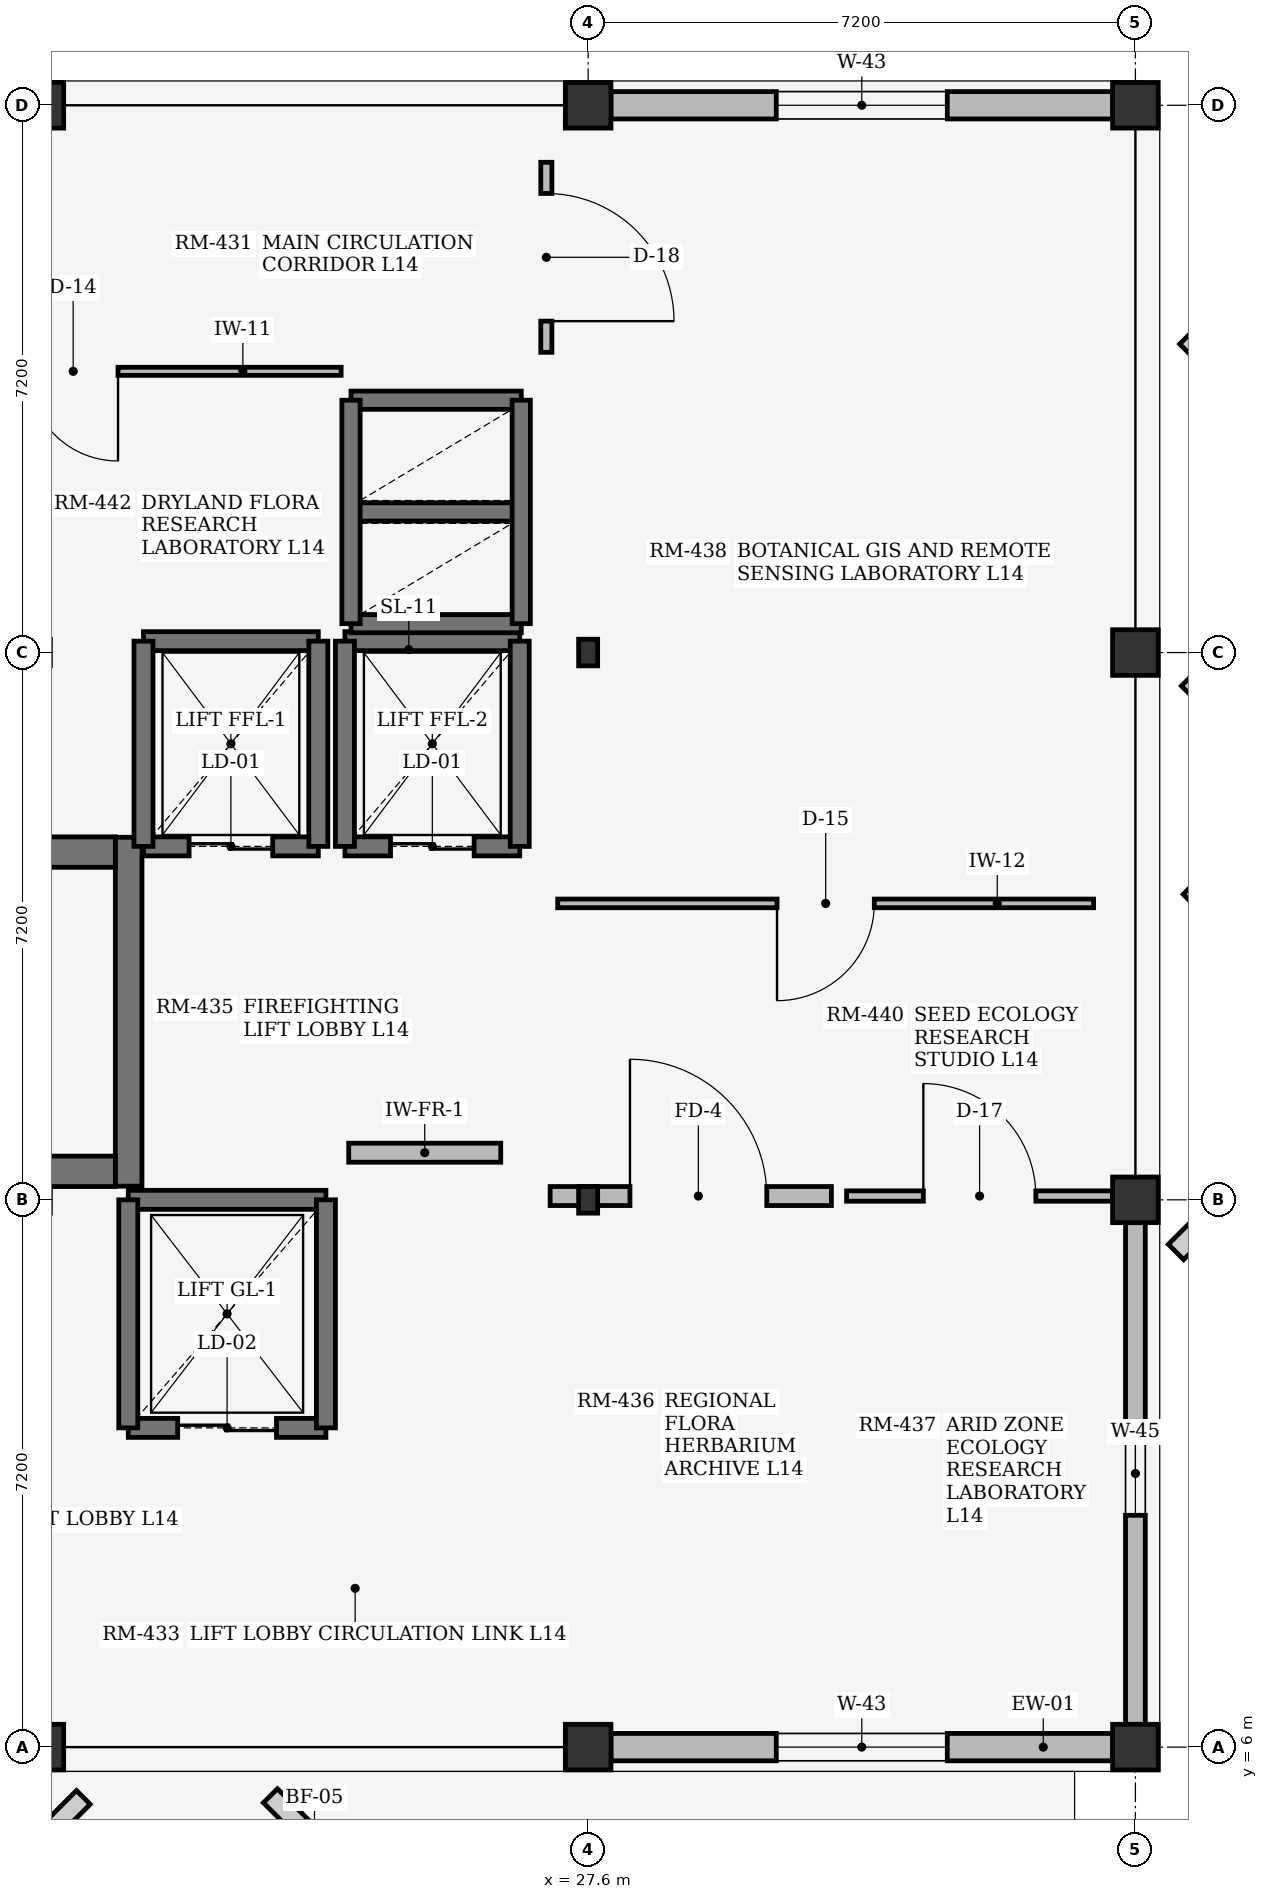
"""IFC4 building model, lengths in metres.
Left out: names, types, materials, properties, quantities, classifications, styles, units other than length and angle.
Written with IfcOpenShell. Run it as: python <this file> out.ifc"""

import sys

from ifc_helpers import new_model, si_unit, direction, frame, frame_2d, origin, origin_2d, place, context, subcontext, project, spatial, rectangle, i_section, extrude, element, fill, save


model = new_model("IFC4")
c1 = context("Model", 3, precision=1e-05, world=origin(), true_north=direction((0.0, 1.0)))
c2 = subcontext(c1, "Body", "Model", "MODEL_VIEW")
j1 = project(units=[si_unit("LENGTHUNIT", "METRE"), si_unit("PLANEANGLEUNIT", "RADIAN")], contexts=[c1])
p1 = place(None, origin())
s1 = spatial("IfcSite", under=j1, at=p1, CompositionType="ELEMENT")
p2 = place(p1, origin())
s2 = spatial("IfcBuilding", under=s1, at=p2, CompositionType="ELEMENT")
p3 = place(p2, frame((0.0, 0.0, 56.1)))
s3 = spatial("IfcBuildingStorey", under=s2, at=p3, CompositionType="ELEMENT", Elevation=56.1)
for number, where, z_axis, x_axis in (
    (1, (20.4, 6.0, 0.0), (0.0, 0.0, 1.0), (1.0, 0.0, 0.0)),
    (2, (20.4, 27.6, 0.0), (0.0, 0.0, 1.0), (1.0, 0.0, 0.0)),
    (3, (27.6, 6.0, 0.0), (0.0, 0.0, 1.0), (1.0, 0.0, 0.0)),
):
    element("IfcColumn", number, at=place(p3, frame(where, z_axis=z_axis, x_axis=x_axis)), inside=s3, PredefinedType="COLUMN", context=c2, shape_type="SweptSolid", body=[
        extrude(rectangle(XDim=0.6, YDim=0.6, at=origin_2d()), origin(), (0.0, 0.0, 1.0), 3.088),
    ])
for number, where, z_axis, x_axis in (
    (4, (27.6, 13.2, 0.0), (0.0, 0.0, 1.0), (1.0, 0.0, 0.0)),
    (5, (27.6, 20.4, 0.0), (0.0, 0.0, 1.0), (1.0, 0.0, 0.0)),
):
    element("IfcColumn", number, at=place(p3, frame(where, z_axis=z_axis, x_axis=x_axis)), inside=s3, PredefinedType="COLUMN", context=c2, shape_type="SweptSolid", body=[
        extrude(i_section(OverallWidth=0.25, OverallDepth=0.35, WebThickness=0.01, FlangeThickness=0.012, at=origin_2d()), origin(), (0.0, 0.0, 1.0), 3.088),
    ])
for number, where, z_axis, x_axis in (
    (6, (27.6, 27.6, 0.0), (0.0, 0.0, 1.0), (1.0, 0.0, 0.0)),
    (7, (34.8, 6.0, 0.0), (0.0, 0.0, 1.0), (1.0, 0.0, 0.0)),
    (8, (34.8, 13.2, 0.0), (0.0, 0.0, 1.0), (1.0, 0.0, 0.0)),
    (9, (34.8, 20.4, 0.0), (0.0, 0.0, 1.0), (1.0, 0.0, 0.0)),
    (10, (34.8, 27.6, 0.0), (0.0, 0.0, 1.0), (1.0, 0.0, 0.0)),
):
    element("IfcColumn", number, at=place(p3, frame(where, z_axis=z_axis, x_axis=x_axis)), inside=s3, PredefinedType="COLUMN", context=c2, shape_type="SweptSolid", body=[
        extrude(rectangle(XDim=0.6, YDim=0.6, at=origin_2d()), origin(), (0.0, 0.0, 1.0), 3.088),
    ])
p4 = place(p3, frame((27.9, 6.0, 0.0), z_axis=(0.0, 0.0, 1.0), x_axis=(1.0, 0.0, 0.0)))
e11 = element("IfcWall", 11, at=p4, inside=s3, PredefinedType="STANDARD", context=c2, shape_type="SweptSolid", body=[
    extrude(rectangle(XDim=6.6, YDim=0.36, at=frame_2d((3.3, 0.0))), origin(), (0.0, 0.0, 1.0), 2.695),
])
p5 = place(p4, frame((2.175, 0.0, 0.75)))
e12 = element("IfcOpeningElement", 12, at=p5, cuts=e11, PredefinedType="OPENING", context=c2, shape_type="SweptSolid", body=[
    extrude(rectangle(XDim=2.25, YDim=1.5, at=frame_2d((1.125, 0.75))), frame((0.0, 0.19, 0.0), z_axis=(0.0, -1.0, 0.0), x_axis=(1.0, 0.0, 0.0)), (0.0, 0.0, 1.0), 0.38),
])
p6 = place(p3, frame((27.9, 27.6, 0.0), z_axis=(0.0, 0.0, 1.0), x_axis=(1.0, 0.0, 0.0)))
e13 = element("IfcWall", 13, at=p6, inside=s3, PredefinedType="STANDARD", context=c2, shape_type="SweptSolid", body=[
    extrude(rectangle(XDim=6.6, YDim=0.36, at=frame_2d((3.3, 0.0))), origin(), (0.0, 0.0, 1.0), 2.695),
])
p7 = place(p6, frame((2.175, 0.0, 0.75)))
e14 = element("IfcOpeningElement", 14, at=p7, cuts=e13, PredefinedType="OPENING", context=c2, shape_type="SweptSolid", body=[
    extrude(rectangle(XDim=2.25, YDim=1.5, at=frame_2d((1.125, 0.75))), frame((0.0, 0.19, 0.0), z_axis=(0.0, -1.0, 0.0), x_axis=(1.0, 0.0, 0.0)), (0.0, 0.0, 1.0), 0.38),
])
p8 = place(p3, frame((34.8, 6.3, 0.0), z_axis=(0.0, 0.0, 1.0), x_axis=(0.0, 1.0, 0.0)))
e15 = element("IfcWall", 15, at=p8, inside=s3, PredefinedType="STANDARD", context=c2, shape_type="SweptSolid", body=[
    extrude(rectangle(XDim=6.6, YDim=0.26, at=frame_2d((3.3, 0.0))), origin(), (0.0, 0.0, 1.0), 2.695),
])
p9 = place(p8, frame((2.75, 0.0, 0.75)))
e16 = element("IfcOpeningElement", 16, at=p9, cuts=e15, PredefinedType="OPENING", context=c2, shape_type="SweptSolid", body=[
    extrude(rectangle(XDim=1.1, YDim=1.25, at=frame_2d((0.55, 0.625))), frame((0.0, 0.14, 0.0), z_axis=(0.0, -1.0, 0.0), x_axis=(1.0, 0.0, 0.0)), (0.0, 0.0, 1.0), 0.28),
])
p10 = place(p3, frame((21.555, 13.38, 0.0), z_axis=(0.0, 0.0, 1.0), x_axis=(0.0, 1.0, 0.0)))
e17 = element("IfcWall", 17, at=p10, inside=s3, PredefinedType="SHEAR", context=c2, shape_type="SweptSolid", body=[
    extrude(rectangle(XDim=4.59, YDim=0.35, at=frame_2d((2.295, 0.0))), origin(), (0.0, 0.0, 1.0), 3.115),
])
for number, where, z_axis, x_axis in (
    (18, (13.4, 13.575, 0.0), (0.0, 0.0, 1.0), (1.0, 0.0, 0.0)),
    (19, (13.4, 17.775, 0.0), (0.0, 0.0, 1.0), (1.0, 0.0, 0.0)),
):
    element("IfcWall", number, at=place(p3, frame(where, z_axis=z_axis, x_axis=x_axis)), inside=s3, PredefinedType="SHEAR", context=c2, shape_type="SweptSolid", body=[
        extrude(rectangle(XDim=7.98, YDim=0.4, at=frame_2d((3.99, 0.0))), origin(), (0.0, 0.0, 1.0), 3.115),
    ])
p11 = place(p3, frame((21.75, 17.85, 0.0), z_axis=(0.0, 0.0, 1.0), x_axis=(1.0, 0.0, 0.0)))
e20 = element("IfcWall", 20, at=p11, inside=s3, PredefinedType="SHEAR", context=c2, shape_type="SweptSolid", body=[
    extrude(rectangle(XDim=2.3, YDim=0.25, at=frame_2d((1.15, 0.0))), origin(), (0.0, 0.0, 1.0), 3.115),
])
p12 = place(p11, frame((0.6, 0.0, 0.0)))
e21 = element("IfcOpeningElement", 21, at=p12, cuts=e20, PredefinedType="OPENING", context=c2, shape_type="SweptSolid", body=[
    extrude(rectangle(XDim=1.1, YDim=2.2, at=frame_2d((0.55, 1.1))), frame((0.0, 0.135, 0.0), z_axis=(0.0, -1.0, 0.0), x_axis=(1.0, 0.0, 0.0)), (0.0, 0.0, 1.0), 0.27),
])
p13 = place(p3, frame((21.75, 20.55, 0.0), z_axis=(0.0, 0.0, 1.0), x_axis=(1.0, 0.0, 0.0)))
e22 = element("IfcWall", 22, at=p13, inside=s3, PredefinedType="SHEAR", context=c2, shape_type="SweptSolid", body=[
    extrude(rectangle(XDim=2.3, YDim=0.25, at=frame_2d((1.15, 0.0))), origin(), (0.0, 0.0, 1.0), 3.115),
])
for number, where, z_axis, x_axis in (
    (23, (21.75, 17.85, 0.0), (0.0, 0.0, 1.0), (0.0, 1.0, 0.0)),
    (24, (24.05, 17.85, 0.0), (0.0, 0.0, 1.0), (0.0, 1.0, 0.0)),
):
    element("IfcWall", number, at=place(p3, frame(where, z_axis=z_axis, x_axis=x_axis)), inside=s3, PredefinedType="SHEAR", context=c2, shape_type="SweptSolid", body=[
        extrude(rectangle(XDim=2.7, YDim=0.25, at=frame_2d((1.35, 0.0))), origin(), (0.0, 0.0, 1.0), 3.115),
    ])
p14 = place(p3, frame((24.4, 17.85, 0.0), z_axis=(0.0, 0.0, 1.0), x_axis=(1.0, 0.0, 0.0)))
e25 = element("IfcWall", 25, at=p14, inside=s3, PredefinedType="SHEAR", context=c2, shape_type="SweptSolid", body=[
    extrude(rectangle(XDim=2.3, YDim=0.25, at=frame_2d((1.15, 0.0))), origin(), (0.0, 0.0, 1.0), 3.115),
])
p15 = place(p14, frame((0.6, 0.0, 0.0)))
e26 = element("IfcOpeningElement", 26, at=p15, cuts=e25, PredefinedType="OPENING", context=c2, shape_type="SweptSolid", body=[
    extrude(rectangle(XDim=1.1, YDim=2.2, at=frame_2d((0.55, 1.1))), frame((0.0, 0.135, 0.0), z_axis=(0.0, -1.0, 0.0), x_axis=(1.0, 0.0, 0.0)), (0.0, 0.0, 1.0), 0.27),
])
p16 = place(p3, frame((24.4, 20.55, 0.0), z_axis=(0.0, 0.0, 1.0), x_axis=(1.0, 0.0, 0.0)))
e27 = element("IfcWall", 27, at=p16, inside=s3, PredefinedType="SHEAR", context=c2, shape_type="SweptSolid", body=[
    extrude(rectangle(XDim=2.3, YDim=0.25, at=frame_2d((1.15, 0.0))), origin(), (0.0, 0.0, 1.0), 3.115),
])
for number, where, z_axis, x_axis in (
    (28, (24.4, 17.85, 0.0), (0.0, 0.0, 1.0), (0.0, 1.0, 0.0)),
    (29, (26.7, 17.85, 0.0), (0.0, 0.0, 1.0), (0.0, 1.0, 0.0)),
):
    element("IfcWall", number, at=place(p3, frame(where, z_axis=z_axis, x_axis=x_axis)), inside=s3, PredefinedType="SHEAR", context=c2, shape_type="SweptSolid", body=[
        extrude(rectangle(XDim=2.7, YDim=0.25, at=frame_2d((1.35, 0.0))), origin(), (0.0, 0.0, 1.0), 3.115),
    ])
p17 = place(p3, frame((21.55, 10.2, 0.0), z_axis=(0.0, 0.0, 1.0), x_axis=(1.0, 0.0, 0.0)))
e30 = element("IfcWall", 30, at=p17, inside=s3, PredefinedType="SHEAR", context=c2, shape_type="SweptSolid", body=[
    extrude(rectangle(XDim=2.6, YDim=0.25, at=frame_2d((1.3, 0.0))), origin(), (0.0, 0.0, 1.0), 3.115),
])
p18 = place(p17, frame((0.65, 0.0, 0.0)))
e31 = element("IfcOpeningElement", 31, at=p18, cuts=e30, PredefinedType="OPENING", context=c2, shape_type="SweptSolid", body=[
    extrude(rectangle(XDim=1.3, YDim=2.25, at=frame_2d((0.65, 1.125))), frame((0.0, 0.135, 0.0), z_axis=(0.0, -1.0, 0.0), x_axis=(1.0, 0.0, 0.0)), (0.0, 0.0, 1.0), 0.27),
])
p19 = place(p3, frame((21.55, 13.2, 0.0), z_axis=(0.0, 0.0, 1.0), x_axis=(1.0, 0.0, 0.0)))
e32 = element("IfcWall", 32, at=p19, inside=s3, PredefinedType="SHEAR", context=c2, shape_type="SweptSolid", body=[
    extrude(rectangle(XDim=2.6, YDim=0.25, at=frame_2d((1.3, 0.0))), origin(), (0.0, 0.0, 1.0), 3.115),
])
for number, where, z_axis, x_axis in (
    (33, (21.55, 10.2, 0.0), (0.0, 0.0, 1.0), (0.0, 1.0, 0.0)),
    (34, (24.15, 10.2, 0.0), (0.0, 0.0, 1.0), (0.0, 1.0, 0.0)),
):
    element("IfcWall", number, at=place(p3, frame(where, z_axis=z_axis, x_axis=x_axis)), inside=s3, PredefinedType="SHEAR", context=c2, shape_type="SweptSolid", body=[
        extrude(rectangle(XDim=3.0, YDim=0.25, at=frame_2d((1.5, 0.0))), origin(), (0.0, 0.0, 1.0), 3.115),
    ])
for number, where, z_axis, x_axis in (
    (35, (24.48, 20.78, 0.0), (0.0, 0.0, 1.0), (1.0, 0.0, 0.0)),
    (36, (24.48, 22.25, 0.0), (0.0, 0.0, 1.0), (1.0, 0.0, 0.0)),
    (37, (24.48, 23.72, 0.0), (0.0, 0.0, 1.0), (1.0, 0.0, 0.0)),
):
    element("IfcWall", number, at=place(p3, frame(where, z_axis=z_axis, x_axis=x_axis)), inside=s3, PredefinedType="SHEAR", context=c2, shape_type="SweptSolid", body=[
        extrude(rectangle(XDim=2.24, YDim=0.24, at=frame_2d((1.12, 0.0))), origin(), (0.0, 0.0, 1.0), 3.115),
    ])
for number, where, z_axis, x_axis in (
    (38, (24.48, 20.78, 0.0), (0.0, 0.0, 1.0), (0.0, 1.0, 0.0)),
    (39, (26.72, 20.78, 0.0), (0.0, 0.0, 1.0), (0.0, 1.0, 0.0)),
):
    element("IfcWall", number, at=place(p3, frame(where, z_axis=z_axis, x_axis=x_axis)), inside=s3, PredefinedType="SHEAR", context=c2, shape_type="SweptSolid", body=[
        extrude(rectangle(XDim=2.94, YDim=0.24, at=frame_2d((1.47, 0.0))), origin(), (0.0, 0.0, 1.0), 3.115),
    ])
p20 = place(p3, frame((24.45, 13.82, 0.0), z_axis=(0.0, 0.0, 1.0), x_axis=(1.0, 0.0, 0.0)))
e40 = element("IfcWall", 40, at=p20, inside=s3, PredefinedType="SOLIDWALL", context=c2, shape_type="SweptSolid", body=[
    extrude(rectangle(XDim=2.0, YDim=0.25, at=frame_2d((1.0, 0.0))), origin(), (0.0, 0.0, 1.0), 3.095),
])
p21 = place(p3, frame((17.3, 24.1, 0.0), z_axis=(0.0, 0.0, 1.0), x_axis=(1.0, 0.0, 0.0)))
e41 = element("IfcWall", 41, at=p21, inside=s3, PredefinedType="PARTITIONING", context=c2, shape_type="SweptSolid", body=[
    extrude(rectangle(XDim=7.05, YDim=0.106, at=frame_2d((3.525, 0.0))), origin(), (0.0, 0.0, 1.0), 3.095),
])
p22 = place(p21, frame((2.935, 0.0, 0.0)))
e42 = element("IfcOpeningElement", 42, at=p22, cuts=e41, PredefinedType="OPENING", context=c2, shape_type="SweptSolid", body=[
    extrude(rectangle(XDim=1.18, YDim=2.1, at=frame_2d((0.59, 1.05))), frame((0.0, 0.063, 0.0), z_axis=(0.0, -1.0, 0.0), x_axis=(1.0, 0.0, 0.0)), (0.0, 0.0, 1.0), 0.126),
])
p23 = place(p3, frame((27.2, 17.1, 0.0), z_axis=(0.0, 0.0, 1.0), x_axis=(1.0, 0.0, 0.0)))
e43 = element("IfcWall", 43, at=p23, inside=s3, PredefinedType="PARTITIONING", context=c2, shape_type="SweptSolid", body=[
    extrude(rectangle(XDim=7.05, YDim=0.114, at=frame_2d((3.525, 0.0))), origin(), (0.0, 0.0, 1.0), 3.095),
])
p24 = place(p23, frame((2.885, 0.0, 0.0)))
e44 = element("IfcOpeningElement", 44, at=p24, cuts=e43, PredefinedType="OPENING", context=c2, shape_type="SweptSolid", body=[
    extrude(rectangle(XDim=1.28, YDim=2.15, at=frame_2d((0.64, 1.075))), frame((0.0, 0.067, 0.0), z_axis=(0.0, -1.0, 0.0), x_axis=(1.0, 0.0, 0.0)), (0.0, 0.0, 1.0), 0.134),
])
p25 = place(p3, frame((27.1, 13.25, 0.0), z_axis=(0.0, 0.0, 1.0), x_axis=(1.0, 0.0, 0.0)))
e45 = element("IfcWall", 45, at=p25, inside=s3, PredefinedType="SOLIDWALL", context=c2, shape_type="SweptSolid", body=[
    extrude(rectangle(XDim=3.7, YDim=0.25, at=frame_2d((1.85, 0.0))), origin(), (0.0, 0.0, 1.0), 2.678),
])
p26 = place(p25, frame((1.05, 0.0, 0.0)))
e46 = element("IfcOpeningElement", 46, at=p26, cuts=e45, PredefinedType="OPENING", context=c2, shape_type="SweptSolid", body=[
    extrude(rectangle(XDim=1.8, YDim=2.25, at=frame_2d((0.9, 1.125))), frame((0.0, 0.135, 0.0), z_axis=(0.0, -1.0, 0.0), x_axis=(1.0, 0.0, 0.0)), (0.0, 0.0, 1.0), 0.27),
])
p27 = place(p3, frame((31.0, 13.25, 0.0), z_axis=(0.0, 0.0, 1.0), x_axis=(1.0, 0.0, 0.0)))
e47 = element("IfcWall", 47, at=p27, inside=s3, PredefinedType="PARTITIONING", context=c2, shape_type="SweptSolid", body=[
    extrude(rectangle(XDim=3.5, YDim=0.136, at=frame_2d((1.75, 0.0))), origin(), (0.0, 0.0, 1.0), 2.678),
])
p28 = place(p27, frame((1.01, 0.0, 0.0)))
e48 = element("IfcOpeningElement", 48, at=p28, cuts=e47, PredefinedType="OPENING", context=c2, shape_type="SweptSolid", body=[
    extrude(rectangle(XDim=1.48, YDim=2.2, at=frame_2d((0.74, 1.1))), frame((0.0, 0.078, 0.0), z_axis=(0.0, -1.0, 0.0), x_axis=(1.0, 0.0, 0.0)), (0.0, 0.0, 1.0), 0.156),
])
p29 = place(p3, frame((27.05, 24.35, 0.0), z_axis=(0.0, 0.0, 1.0), x_axis=(0.0, 1.0, 0.0)))
e49 = element("IfcWall", 49, at=p29, inside=s3, PredefinedType="PARTITIONING", context=c2, shape_type="SweptSolid", body=[
    extrude(rectangle(XDim=2.5, YDim=0.146, at=frame_2d((1.25, 0.0))), origin(), (0.0, 0.0, 1.0), 3.095),
])
p30 = place(p29, frame((0.41, 0.0, 0.0)))
e50 = element("IfcOpeningElement", 50, at=p30, cuts=e49, PredefinedType="OPENING", context=c2, shape_type="SweptSolid", body=[
    extrude(rectangle(XDim=1.68, YDim=2.3, at=frame_2d((0.84, 1.15))), frame((0.0, 0.083, 0.0), z_axis=(0.0, -1.0, 0.0), x_axis=(1.0, 0.0, 0.0)), (0.0, 0.0, 1.0), 0.166),
])
p31 = place(p5, origin())
e51 = element("IfcWindow", 51, at=p31, inside=s3, PartitioningType="SINGLE_PANEL", PredefinedType="WINDOW", context=c2, shape_type="SweptSolid", body=[
    extrude(rectangle(XDim=2.25, YDim=1.5, at=frame_2d((1.125, 0.75))), frame((0.0, 0.03, 0.0), z_axis=(0.0, -1.0, 0.0), x_axis=(1.0, 0.0, 0.0)), (0.0, 0.0, 1.0), 0.06),
])
fill(e12, e51)
p32 = place(p7, origin())
e52 = element("IfcWindow", 52, at=p32, inside=s3, PartitioningType="SINGLE_PANEL", PredefinedType="WINDOW", context=c2, shape_type="SweptSolid", body=[
    extrude(rectangle(XDim=2.25, YDim=1.5, at=frame_2d((1.125, 0.75))), frame((0.0, 0.03, 0.0), z_axis=(0.0, -1.0, 0.0), x_axis=(1.0, 0.0, 0.0)), (0.0, 0.0, 1.0), 0.06),
])
fill(e14, e52)
p33 = place(p9, origin())
e53 = element("IfcWindow", 53, at=p33, inside=s3, PartitioningType="SINGLE_PANEL", PredefinedType="WINDOW", context=c2, shape_type="SweptSolid", body=[
    extrude(rectangle(XDim=1.1, YDim=1.25, at=frame_2d((0.55, 0.625))), frame((0.0, 0.03, 0.0), z_axis=(0.0, -1.0, 0.0), x_axis=(1.0, 0.0, 0.0)), (0.0, 0.0, 1.0), 0.06),
])
fill(e16, e53)
p34 = place(p12, origin())
e54 = element("IfcDoor", 54, at=p34, inside=s3, OperationType="DOUBLE_DOOR_SLIDING", PredefinedType="DOOR", context=c2, shape_type="SweptSolid", body=[
    extrude(rectangle(XDim=1.1, YDim=2.2, at=frame_2d((0.55, 1.1))), frame((0.0, 0.025, 0.0), z_axis=(0.0, -1.0, 0.0), x_axis=(1.0, 0.0, 0.0)), (0.0, 0.0, 1.0), 0.05),
])
fill(e21, e54)
p35 = place(p15, origin())
e55 = element("IfcDoor", 55, at=p35, inside=s3, OperationType="DOUBLE_DOOR_SLIDING", PredefinedType="DOOR", context=c2, shape_type="SweptSolid", body=[
    extrude(rectangle(XDim=1.1, YDim=2.2, at=frame_2d((0.55, 1.1))), frame((0.0, 0.025, 0.0), z_axis=(0.0, -1.0, 0.0), x_axis=(1.0, 0.0, 0.0)), (0.0, 0.0, 1.0), 0.05),
])
fill(e26, e55)
p36 = place(p18, origin())
e56 = element("IfcDoor", 56, at=p36, inside=s3, OperationType="DOUBLE_DOOR_SLIDING", PredefinedType="DOOR", context=c2, shape_type="SweptSolid", body=[
    extrude(rectangle(XDim=1.3, YDim=2.25, at=frame_2d((0.65, 1.125))), frame((0.0, 0.025, 0.0), z_axis=(0.0, -1.0, 0.0), x_axis=(1.0, 0.0, 0.0)), (0.0, 0.0, 1.0), 0.05),
])
fill(e31, e56)
p37 = place(p22, origin())
e57 = element("IfcDoor", 57, at=p37, inside=s3, OperationType="SINGLE_SWING_RIGHT", PredefinedType="DOOR", context=c2, shape_type="SweptSolid", body=[
    extrude(rectangle(XDim=1.18, YDim=2.1, at=frame_2d((0.59, 1.05))), frame((0.0, 0.025, 0.0), z_axis=(0.0, -1.0, 0.0), x_axis=(1.0, 0.0, 0.0)), (0.0, 0.0, 1.0), 0.05),
])
fill(e42, e57)
p38 = place(p24, frame((1.28, 0.0, 0.0), z_axis=(0.0, 0.0, 1.0), x_axis=(-1.0, 0.0, 0.0)))
e58 = element("IfcDoor", 58, at=p38, inside=s3, OperationType="SINGLE_SWING_LEFT", PredefinedType="DOOR", context=c2, shape_type="SweptSolid", body=[
    extrude(rectangle(XDim=1.28, YDim=2.15, at=frame_2d((0.64, 1.075))), frame((0.0, 0.025, 0.0), z_axis=(0.0, -1.0, 0.0), x_axis=(1.0, 0.0, 0.0)), (0.0, 0.0, 1.0), 0.05),
])
fill(e44, e58)
p39 = place(p26, origin())
e59 = element("IfcDoor", 59, at=p39, inside=s3, OperationType="DOUBLE_DOOR_SINGLE_SWING", PredefinedType="DOOR", context=c2, shape_type="SweptSolid", body=[
    extrude(rectangle(XDim=1.8, YDim=2.25, at=frame_2d((0.9, 1.125))), frame((0.0, 0.025, 0.0), z_axis=(0.0, -1.0, 0.0), x_axis=(1.0, 0.0, 0.0)), (0.0, 0.0, 1.0), 0.05),
])
fill(e46, e59)
p40 = place(p28, origin())
e60 = element("IfcDoor", 60, at=p40, inside=s3, OperationType="SINGLE_SWING_LEFT", PredefinedType="DOOR", context=c2, shape_type="SweptSolid", body=[
    extrude(rectangle(XDim=1.48, YDim=2.2, at=frame_2d((0.74, 1.1))), frame((0.0, 0.025, 0.0), z_axis=(0.0, -1.0, 0.0), x_axis=(1.0, 0.0, 0.0)), (0.0, 0.0, 1.0), 0.05),
])
fill(e48, e60)
p41 = place(p30, frame((1.68, 0.0, 0.0), z_axis=(0.0, 0.0, 1.0), x_axis=(-1.0, 0.0, 0.0)))
e61 = element("IfcDoor", 61, at=p41, inside=s3, OperationType="DOUBLE_DOOR_SINGLE_SWING", PredefinedType="DOOR", context=c2, shape_type="SweptSolid", body=[
    extrude(rectangle(XDim=1.68, YDim=2.3, at=frame_2d((0.84, 1.15))), frame((0.0, 0.025, 0.0), z_axis=(0.0, -1.0, 0.0), x_axis=(1.0, 0.0, 0.0)), (0.0, 0.0, 1.0), 0.05),
])
fill(e50, e61)
save(model, sys.argv[1])
